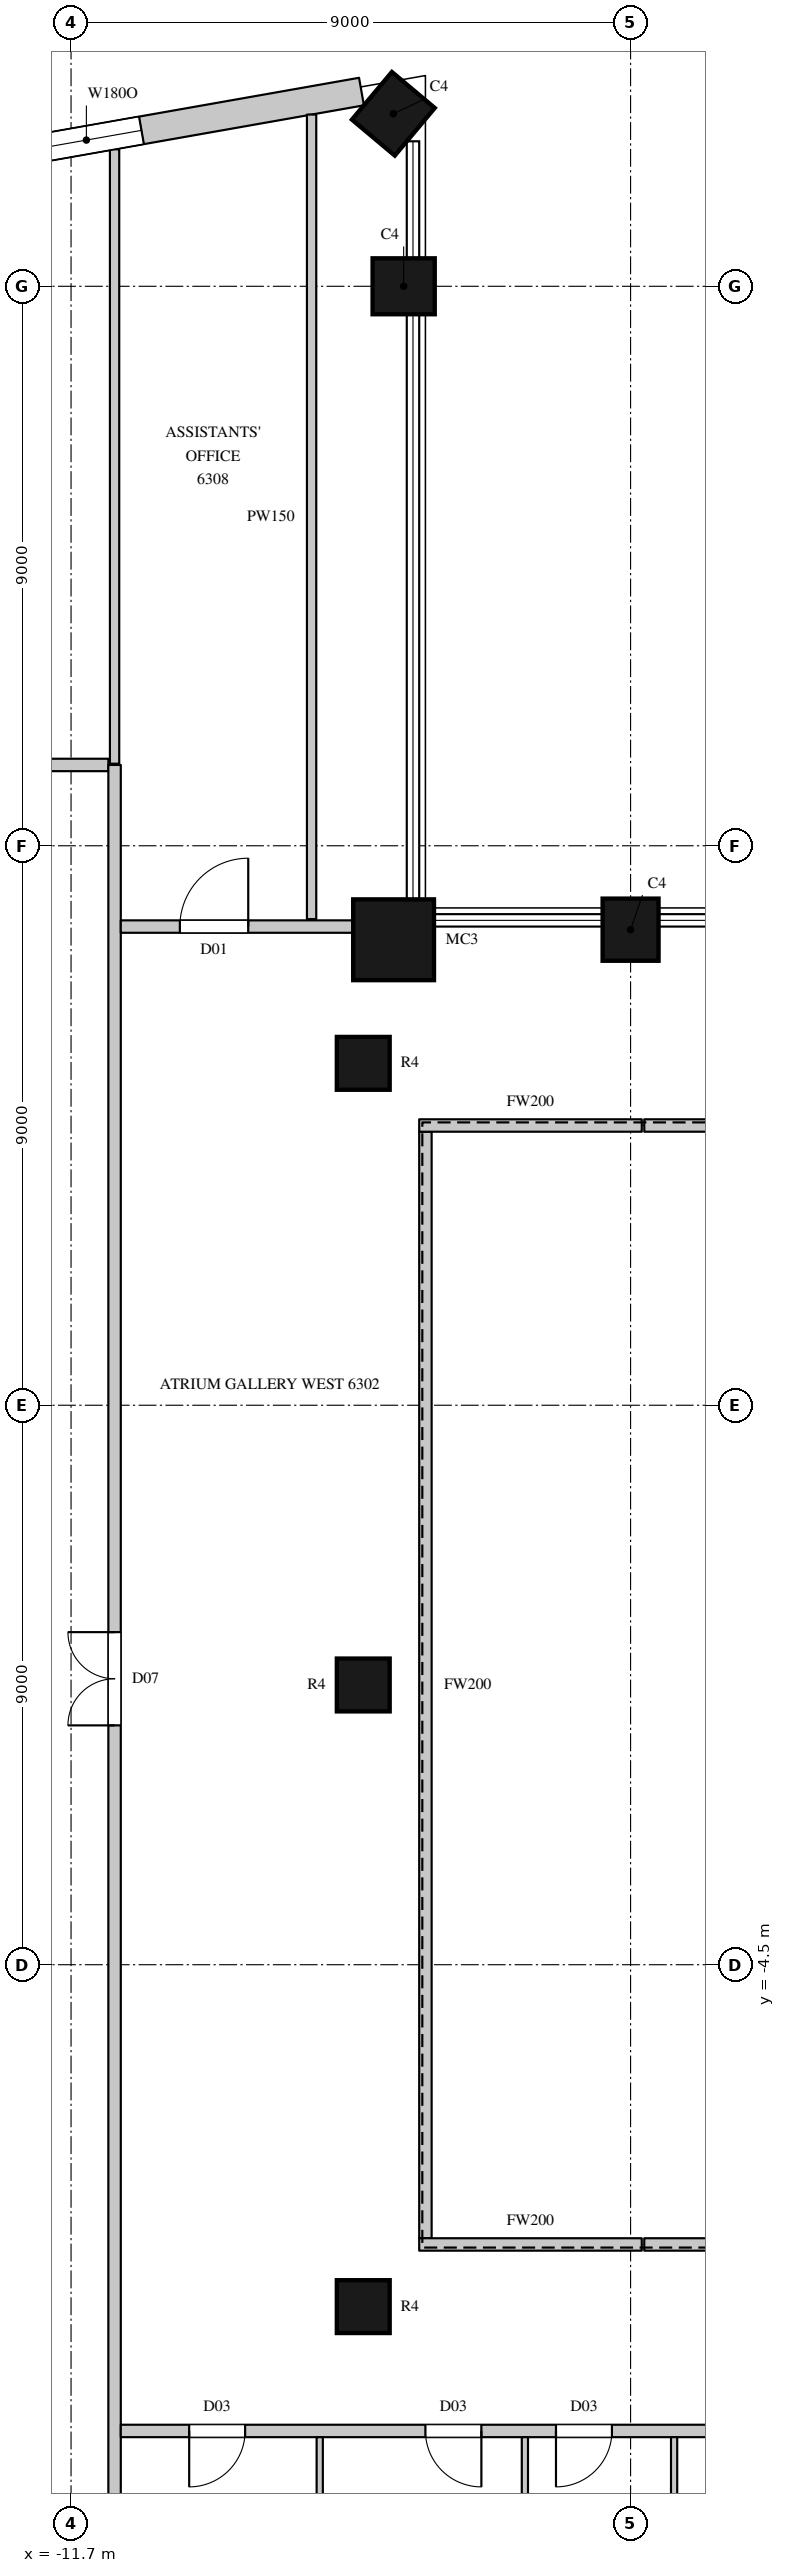
"""IFC4 building model, lengths in metres.
Left out: names, types, materials, properties, quantities, classifications, styles, units other than length and angle.
Written with IfcOpenShell. Run it as: python <this file> out.ifc"""

import sys

from ifc_helpers import new_model, si_unit, direction, frame, frame_2d, origin, origin_2d, place, context, subcontext, project, spatial, rectangle, circle, extrude, element, fill, save


model = new_model("IFC4")
c1 = context("Model", 3, precision=1e-05, world=origin(), true_north=direction((0.0, 1.0)))
c2 = subcontext(c1, "Body", "Model", "MODEL_VIEW")
j1 = project(units=[si_unit("LENGTHUNIT", "METRE"), si_unit("PLANEANGLEUNIT", "RADIAN")], contexts=[c1])
p1 = place(None, origin())
s1 = spatial("IfcSite", under=j1, at=p1, CompositionType="ELEMENT")
p2 = place(p1, origin())
s2 = spatial("IfcBuilding", under=s1, at=p2, CompositionType="ELEMENT")
p3 = place(p2, frame((0.0, 0.0, 280.3)))
s3 = spatial("IfcBuildingStorey", under=s2, at=p3, CompositionType="ELEMENT", Elevation=280.3)
p4 = place(p3, frame((-2.7, 12.15, 0.0), z_axis=(0.0, 0.0, 1.0), x_axis=(-1.0, 0.0, 0.0)))
e1 = element("IfcColumn", 1, at=p4, inside=s3, PredefinedType="COLUMN", context=c2, shape_type="SweptSolid", body=[
    extrude(rectangle(XDim=0.9, YDim=1.0, at=origin_2d()), origin(), (0.0, 0.0, 1.0), 4.1),
])
p5 = place(p3, frame((-6.512, 11.988, 0.0), z_axis=(0.0, 0.0, 1.0), x_axis=(1.0, 0.0, 0.0)))
e2 = element("IfcColumn", 2, at=p5, inside=s3, PredefinedType="COLUMN", context=c2, shape_type="SweptSolid", body=[
    extrude(circle(Radius=0.65, at=origin_2d()), origin(), (0.0, 0.0, 1.0), 4.1),
])
for number, where, z_axis, x_axis in (
    (3, (-6.35, 22.5, 0.0), (0.0, 0.0, 1.0), (0.0, 1.0, 0.0)),
    (4, (-6.516, 25.275, 0.0), (0.0, 0.0, 1.0), (-0.766, 0.643, 0.0)),
):
    element("IfcColumn", number, at=place(p3, frame(where, z_axis=z_axis, x_axis=x_axis)), inside=s3, PredefinedType="COLUMN", context=c2, shape_type="SweptSolid", body=[
        extrude(rectangle(XDim=0.9, YDim=1.0, at=origin_2d()), origin(), (0.0, 0.0, 1.0), 4.1),
    ])
for number, where, z_axis, x_axis in (
    (5, (-7.0, -10.0, 0.0), (0.0, 0.0, 1.0), (1.0, 0.0, 0.0)),
    (6, (-7.0, 0.0, 0.0), (0.0, 0.0, 1.0), (1.0, 0.0, 0.0)),
    (7, (-7.0, 10.0, 0.0), (0.0, 0.0, 1.0), (1.0, 0.0, 0.0)),
):
    element("IfcColumn", number, at=place(p3, frame(where, z_axis=z_axis, x_axis=x_axis)), inside=s3, PredefinedType="COLUMN", context=c2, shape_type="SweptSolid", body=[
        extrude(circle(Radius=0.425, at=origin_2d()), origin(), (0.0, 0.0, 1.0), 4.1),
    ])
p6 = place(p3, frame((-7.029, 25.632, 0.0), z_axis=(0.0, 0.0, 1.0), x_axis=(-0.984797606634, -0.173705710808, 0.0)))
e8 = element("IfcWall", 8, at=p6, inside=s3, PredefinedType="SOLIDWALL", context=c2, shape_type="SweptSolid", body=[
    extrude(rectangle(XDim=5.772, YDim=0.45, at=frame_2d((2.886, 0.0))), origin(), (0.0, 0.0, 1.0), 3.8),
])
p7 = place(p6, frame((3.593, 0.0, 1.05)))
e9 = element("IfcOpeningElement", 9, at=p7, cuts=e8, PredefinedType="OPENING", context=c2, shape_type="SweptSolid", body=[
    extrude(rectangle(XDim=1.8, YDim=2.4, at=frame_2d((0.9, 1.2))), frame((0.0, 0.235, 0.0), z_axis=(0.0, -1.0, 0.0), x_axis=(1.0, 0.0, 0.0)), (0.0, 0.0, 1.0), 0.47),
])
p8 = place(p3, frame((-13.97, 14.8, 0.0), z_axis=(0.0, 0.0, 1.0), x_axis=(1.0, 0.0, 0.0)))
e10 = element("IfcWall", 10, at=p8, inside=s3, PredefinedType="PARTITIONING", context=c2, shape_type="SweptSolid", body=[
    extrude(rectangle(XDim=2.87, YDim=0.2, at=frame_2d((1.435, 0.0))), origin(), (0.0, 0.0, 1.0), 3.8),
])
p9 = place(p3, frame((-11.0, -14.8, 0.0), z_axis=(0.0, 0.0, 1.0), x_axis=(0.0, 1.0, 0.0)))
e11 = element("IfcWall", 11, at=p9, inside=s3, PredefinedType="PARTITIONING", context=c2, shape_type="SweptSolid", body=[
    extrude(rectangle(XDim=29.6, YDim=0.2, at=frame_2d((14.8, 0.0))), origin(), (0.0, 0.0, 1.0), 3.8),
])
p10 = place(p9, frame((14.15, 0.0, 0.0)))
e12 = element("IfcOpeningElement", 12, at=p10, cuts=e11, PredefinedType="OPENING", context=c2, shape_type="SweptSolid", body=[
    extrude(rectangle(XDim=1.5, YDim=2.4, at=frame_2d((0.75, 1.2))), frame((0.0, 0.11, 0.0), z_axis=(0.0, -1.0, 0.0), x_axis=(1.0, 0.0, 0.0)), (0.0, 0.0, 1.0), 0.22),
])
p11 = place(p3, frame((-10.9, -12.0, 0.0), z_axis=(0.0, 0.0, 1.0), x_axis=(1.0, 0.0, 0.0)))
e13 = element("IfcWall", 13, at=p11, inside=s3, PredefinedType="PARTITIONING", context=c2, shape_type="SweptSolid", body=[
    extrude(rectangle(XDim=21.8, YDim=0.2, at=frame_2d((10.9, 0.0))), origin(), (0.0, 0.0, 1.0), 3.8),
])
p12 = place(p11, frame((1.1, 0.0, 0.0)))
e14 = element("IfcOpeningElement", 14, at=p12, cuts=e13, PredefinedType="OPENING", context=c2, shape_type="SweptSolid", body=[
    extrude(rectangle(XDim=0.9, YDim=2.2, at=frame_2d((0.45, 1.1))), frame((0.0, 0.11, 0.0), z_axis=(0.0, -1.0, 0.0), x_axis=(1.0, 0.0, 0.0)), (0.0, 0.0, 1.0), 0.22),
])
p13 = place(p11, frame((4.9, 0.0, 0.0)))
e15 = element("IfcOpeningElement", 15, at=p13, cuts=e13, PredefinedType="OPENING", context=c2, shape_type="SweptSolid", body=[
    extrude(rectangle(XDim=0.9, YDim=2.2, at=frame_2d((0.45, 1.1))), frame((0.0, 0.11, 0.0), z_axis=(0.0, -1.0, 0.0), x_axis=(1.0, 0.0, 0.0)), (0.0, 0.0, 1.0), 0.22),
])
p14 = place(p11, frame((7.0, 0.0, 0.0)))
e16 = element("IfcOpeningElement", 16, at=p14, cuts=e13, PredefinedType="OPENING", context=c2, shape_type="SweptSolid", body=[
    extrude(rectangle(XDim=0.9, YDim=2.2, at=frame_2d((0.45, 1.1))), frame((0.0, 0.11, 0.0), z_axis=(0.0, -1.0, 0.0), x_axis=(1.0, 0.0, 0.0)), (0.0, 0.0, 1.0), 0.22),
])
p15 = place(p11, frame((9.95, 0.0, 0.0)))
e17 = element("IfcOpeningElement", 17, at=p15, cuts=e13, PredefinedType="OPENING", context=c2, shape_type="SweptSolid", body=[
    extrude(rectangle(XDim=1.1, YDim=2.4, at=frame_2d((0.55, 1.2))), frame((0.0, 0.11, 0.0), z_axis=(0.0, -1.0, 0.0), x_axis=(1.0, 0.0, 0.0)), (0.0, 0.0, 1.0), 0.22),
])
p16 = place(p3, frame((-10.9, 12.2, 0.0), z_axis=(0.0, 0.0, 1.0), x_axis=(1.0, 0.0, 0.0)))
e18 = element("IfcWall", 18, at=p16, inside=s3, PredefinedType="PARTITIONING", context=c2, shape_type="SweptSolid", body=[
    extrude(rectangle(XDim=3.756, YDim=0.2, at=frame_2d((1.878, 0.0))), origin(), (0.0, 0.0, 1.0), 3.8),
])
p17 = place(p16, frame((0.95, 0.0, 0.0)))
e19 = element("IfcOpeningElement", 19, at=p17, cuts=e18, PredefinedType="OPENING", context=c2, shape_type="SweptSolid", body=[
    extrude(rectangle(XDim=1.1, YDim=2.4, at=frame_2d((0.55, 1.2))), frame((0.0, 0.11, 0.0), z_axis=(0.0, -1.0, 0.0), x_axis=(1.0, 0.0, 0.0)), (0.0, 0.0, 1.0), 0.22),
])
p18 = place(p3, frame((-6.0, -8.9, 0.0), z_axis=(0.0, 0.0, 1.0), x_axis=(0.0, 1.0, 0.0)))
e20 = element("IfcWall", 20, at=p18, inside=s3, PredefinedType="PARTITIONING", context=c2, shape_type="SweptSolid", body=[
    extrude(rectangle(XDim=17.8, YDim=0.2, at=frame_2d((8.9, 0.0))), origin(), (0.0, 0.0, 1.0), 3.8),
])
for number, where, z_axis, x_axis in (
    (21, (-6.1, -9.0, 0.0), (0.0, 0.0, 1.0), (1.0, 0.0, 0.0)),
    (22, (-6.1, 9.0, 0.0), (0.0, 0.0, 1.0), (1.0, 0.0, 0.0)),
):
    element("IfcWall", number, at=place(p3, frame(where, z_axis=z_axis, x_axis=x_axis)), inside=s3, PredefinedType="PARTITIONING", context=c2, shape_type="SweptSolid", body=[
        extrude(rectangle(XDim=3.58, YDim=0.2, at=frame_2d((1.79, 0.0))), origin(), (0.0, 0.0, 1.0), 3.8),
    ])
for number, where, z_axis, x_axis in (
    (23, (-2.48, -9.0, 0.0), (0.0, 0.0, 1.0), (1.0, 0.0, 0.0)),
    (24, (-2.48, 9.0, 0.0), (0.0, 0.0, 1.0), (1.0, 0.0, 0.0)),
):
    element("IfcWall", number, at=place(p3, frame(where, z_axis=z_axis, x_axis=x_axis)), inside=s3, PredefinedType="PARTITIONING", context=c2, shape_type="SweptSolid", body=[
        extrude(rectangle(XDim=10.58, YDim=0.2, at=frame_2d((5.29, 0.0))), origin(), (0.0, 0.0, 1.0), 3.8),
    ])
p19 = place(p3, frame((-11.0, 14.82, 0.0), z_axis=(0.0, 0.0, 1.0), x_axis=(0.0, 1.0, 0.0)))
e25 = element("IfcWall", 25, at=p19, inside=s3, PredefinedType="PARTITIONING", context=c2, shape_type="SweptSolid", body=[
    extrude(rectangle(XDim=9.883, YDim=0.15, at=frame_2d((4.942, 0.0))), origin(), (0.0, 0.0, 1.0), 3.8),
])
p20 = place(p3, frame((-7.831, 12.32, 0.0), z_axis=(0.0, 0.0, 1.0), x_axis=(0.0, 1.0, 0.0)))
e26 = element("IfcWall", 26, at=p20, inside=s3, PredefinedType="PARTITIONING", context=c2, shape_type="SweptSolid", body=[
    extrude(rectangle(XDim=12.942, YDim=0.15, at=frame_2d((6.471, 0.0))), origin(), (0.0, 0.0, 1.0), 3.8),
])
for number, where, z_axis, x_axis in (
    (27, (-7.7, -24.04, 0.0), (0.0, 0.0, 1.0), (0.0, 1.0, 0.0)),
    (28, (-4.4, -24.04, 0.0), (0.0, 0.0, 1.0), (0.0, 1.0, 0.0)),
):
    element("IfcWall", number, at=place(p3, frame(where, z_axis=z_axis, x_axis=x_axis)), inside=s3, PredefinedType="PARTITIONING", context=c2, shape_type="SweptSolid", body=[
        extrude(rectangle(XDim=11.94, YDim=0.1, at=frame_2d((5.97, 0.0))), origin(), (0.0, 0.0, 1.0), 3.8),
    ])
p21 = place(p3, frame((-2.0, -23.447, 0.0), z_axis=(0.0, 0.0, 1.0), x_axis=(0.0, 1.0, 0.0)))
e29 = element("IfcWall", 29, at=p21, inside=s3, PredefinedType="PARTITIONING", context=c2, shape_type="SweptSolid", body=[
    extrude(rectangle(XDim=11.347, YDim=0.1, at=frame_2d((5.674, 0.0))), origin(), (0.0, 0.0, 1.0), 3.8),
])
p22 = place(p7, origin())
e30 = element("IfcWindow", 30, at=p22, inside=s3, PartitioningType="SINGLE_PANEL", PredefinedType="WINDOW", context=c2, shape_type="SweptSolid", body=[
    extrude(rectangle(XDim=1.8, YDim=2.4, at=frame_2d((0.9, 1.2))), frame((0.0, 0.135, 0.0), z_axis=(0.0, -1.0, 0.0), x_axis=(1.0, 0.0, 0.0)), (0.0, 0.0, 1.0), 0.06),
])
fill(e9, e30)
p23 = place(p10, origin())
e31 = element("IfcDoor", 31, at=p23, inside=s3, OperationType="DOUBLE_DOOR_SINGLE_SWING", PredefinedType="DOOR", context=c2, shape_type="SweptSolid", body=[
    extrude(rectangle(XDim=1.5, YDim=2.4, at=frame_2d((0.75, 1.2))), frame((0.0, 0.025, 0.0), z_axis=(0.0, -1.0, 0.0), x_axis=(1.0, 0.0, 0.0)), (0.0, 0.0, 1.0), 0.05),
])
fill(e12, e31)
p24 = place(p12, origin())
e32 = element("IfcDoor", 32, at=p24, inside=s3, OperationType="SINGLE_SWING_RIGHT", PredefinedType="DOOR", context=c2, shape_type="SweptSolid", body=[
    extrude(rectangle(XDim=0.9, YDim=2.2, at=frame_2d((0.45, 1.1))), frame((0.0, 0.025, 0.0), z_axis=(0.0, -1.0, 0.0), x_axis=(1.0, 0.0, 0.0)), (0.0, 0.0, 1.0), 0.05),
])
fill(e14, e32)
p25 = place(p13, origin())
e33 = element("IfcDoor", 33, at=p25, inside=s3, OperationType="SINGLE_SWING_LEFT", PredefinedType="DOOR", context=c2, shape_type="SweptSolid", body=[
    extrude(rectangle(XDim=0.9, YDim=2.2, at=frame_2d((0.45, 1.1))), frame((0.0, 0.025, 0.0), z_axis=(0.0, -1.0, 0.0), x_axis=(1.0, 0.0, 0.0)), (0.0, 0.0, 1.0), 0.05),
])
fill(e15, e33)
p26 = place(p14, origin())
e34 = element("IfcDoor", 34, at=p26, inside=s3, OperationType="SINGLE_SWING_RIGHT", PredefinedType="DOOR", context=c2, shape_type="SweptSolid", body=[
    extrude(rectangle(XDim=0.9, YDim=2.2, at=frame_2d((0.45, 1.1))), frame((0.0, 0.025, 0.0), z_axis=(0.0, -1.0, 0.0), x_axis=(1.0, 0.0, 0.0)), (0.0, 0.0, 1.0), 0.05),
])
fill(e16, e34)
p27 = place(p17, origin())
e35 = element("IfcDoor", 35, at=p27, inside=s3, OperationType="SINGLE_SWING_RIGHT", PredefinedType="DOOR", context=c2, shape_type="SweptSolid", body=[
    extrude(rectangle(XDim=1.1, YDim=2.4, at=frame_2d((0.55, 1.2))), frame((0.0, 0.025, 0.0), z_axis=(0.0, -1.0, 0.0), x_axis=(1.0, 0.0, 0.0)), (0.0, 0.0, 1.0), 0.05),
])
fill(e19, e35)
save(model, sys.argv[1])
